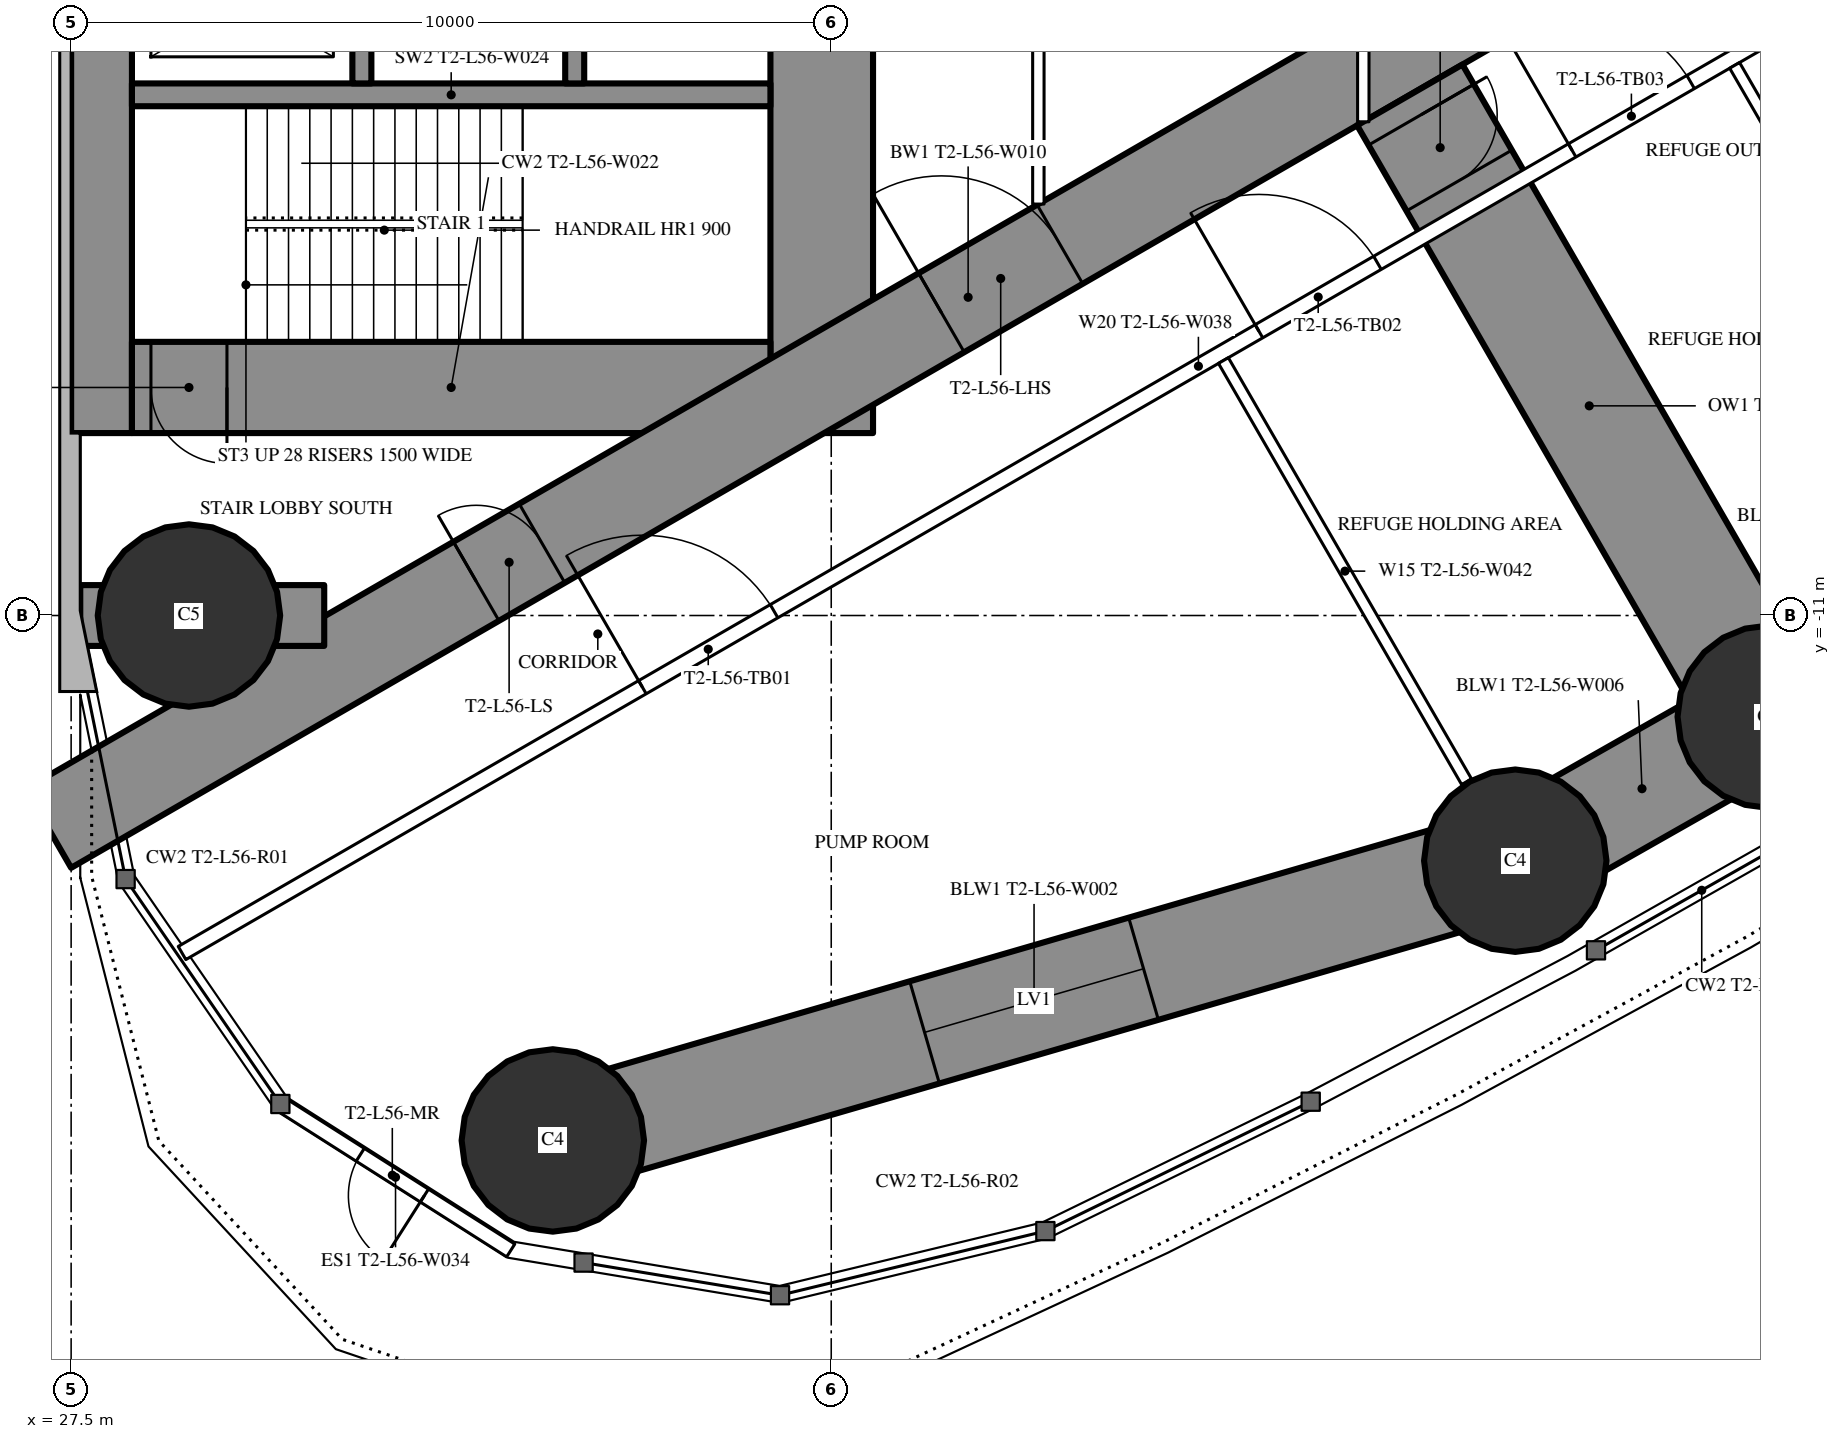
"""IFC4 building model, lengths in metres.
Left out: names, types, materials, properties, quantities, classifications, styles, units other than length and angle.
Written with IfcOpenShell. Run it as: python <this file> out.ifc"""

import sys

from ifc_helpers import new_model, si_unit, direction, frame, frame_2d, origin, origin_2d, place, context, subcontext, project, spatial, rectangle, circle, hollow_circle, extrude, element, fill, save


model = new_model("IFC4")
c1 = context("Model", 3, precision=1e-05, world=origin(), true_north=direction((0.0, 1.0)))
c2 = subcontext(c1, "Body", "Model", "MODEL_VIEW")
j1 = project(units=[si_unit("LENGTHUNIT", "METRE"), si_unit("PLANEANGLEUNIT", "RADIAN")], contexts=[c1])
p1 = place(None, origin())
s1 = spatial("IfcSite", under=j1, at=p1, CompositionType="ELEMENT")
p2 = place(p1, origin())
s2 = spatial("IfcBuilding", under=s1, at=p2, CompositionType="ELEMENT")
p3 = place(p2, frame((0.0, 0.0, 210.3)))
s3 = spatial("IfcBuildingStorey", under=s2, at=p3, CompositionType="ELEMENT", Elevation=210.3)
p4 = place(p3, frame((33.837, -17.906, 0.0), z_axis=(0.0, 0.0, 1.0), x_axis=(1.0, 0.0, 0.0)))
e1 = element("IfcColumn", 1, at=p4, inside=s3, PredefinedType="COLUMN", context=c2, shape_type="SweptSolid", body=[
    extrude(circle(Radius=1.2, at=origin_2d()), origin(), (0.0, 0.0, 1.0), 5.0),
])
p5 = place(p3, frame((29.05, -11.0, 0.0), z_axis=(0.0, 0.0, 1.0), x_axis=(1.0, 0.0, 0.0)))
e2 = element("IfcColumn", 2, at=p5, inside=s3, PredefinedType="COLUMN", context=c2, shape_type="SweptSolid", body=[
    extrude(hollow_circle(Radius=1.2, WallThickness=0.09, at=origin_2d()), origin(), (0.0, 0.0, 1.0), 5.0),
])
for number, where, z_axis, x_axis in (
    (3, (46.499, -14.226, 0.0), (0.0, 0.0, 1.0), (1.0, 0.0, 0.0)),
    (4, (49.834, -12.332, 0.0), (0.0, 0.0, 1.0), (1.0, 0.0, 0.0)),
):
    element("IfcColumn", number, at=place(p3, frame(where, z_axis=z_axis, x_axis=x_axis)), inside=s3, PredefinedType="COLUMN", context=c2, shape_type="SweptSolid", body=[
        extrude(circle(Radius=1.2, at=origin_2d()), origin(), (0.0, 0.0, 1.0), 5.0),
    ])
p6 = place(p3, frame((27.9, -8.6, 0.0), z_axis=(0.0, 0.0, 1.0), x_axis=(0.0, 1.0, 0.0)))
e5 = element("IfcWall", 5, at=p6, inside=s3, PredefinedType="SHEAR", context=c2, shape_type="SweptSolid", body=[
    extrude(rectangle(XDim=17.2, YDim=0.8, at=frame_2d((8.6, 0.0))), origin(), (0.0, 0.0, 1.0), 5.0),
])
p7 = place(p6, frame((9.35, 0.0, 0.0)))
e6 = element("IfcOpeningElement", 6, at=p7, cuts=e5, PredefinedType="OPENING", context=c2, shape_type="SweptSolid", body=[
    extrude(rectangle(XDim=0.9, YDim=2.2, at=frame_2d((0.45, 1.1))), frame((0.0, 0.41, 0.0), z_axis=(0.0, -1.0, 0.0), x_axis=(1.0, 0.0, 0.0)), (0.0, 0.0, 1.0), 0.82),
])
p8 = place(p3, frame((37.375, -8.6, 0.0), z_axis=(0.0, 0.0, 1.0), x_axis=(0.0, 1.0, 0.0)))
e7 = element("IfcWall", 7, at=p8, inside=s3, PredefinedType="SHEAR", context=c2, shape_type="SweptSolid", body=[
    extrude(rectangle(XDim=17.2, YDim=1.35, at=frame_2d((8.6, 0.0))), origin(), (0.0, 0.0, 1.0), 5.0),
])
p9 = place(p8, frame((7.7, 0.0, 0.0)))
e8 = element("IfcOpeningElement", 8, at=p9, cuts=e7, PredefinedType="OPENING", context=c2, shape_type="SweptSolid", body=[
    extrude(rectangle(XDim=1.8, YDim=2.2, at=frame_2d((0.9, 1.1))), frame((0.0, 0.685, 0.0), z_axis=(0.0, -1.0, 0.0), x_axis=(1.0, 0.0, 0.0)), (0.0, 0.0, 1.0), 1.37),
])
p10 = place(p3, frame((28.3, -8.0, 0.0), z_axis=(0.0, 0.0, 1.0), x_axis=(1.0, 0.0, 0.0)))
e9 = element("IfcWall", 9, at=p10, inside=s3, PredefinedType="SHEAR", context=c2, shape_type="SweptSolid", body=[
    extrude(rectangle(XDim=8.4, YDim=1.2, at=frame_2d((4.2, 0.0))), origin(), (0.0, 0.0, 1.0), 5.0),
])
p11 = place(p10, frame((0.25, 0.0, 0.0)))
e10 = element("IfcOpeningElement", 10, at=p11, cuts=e9, PredefinedType="OPENING", context=c2, shape_type="SweptSolid", body=[
    extrude(rectangle(XDim=1.0, YDim=2.2, at=frame_2d((0.5, 1.1))), frame((0.0, 0.61, 0.0), z_axis=(0.0, -1.0, 0.0), x_axis=(1.0, 0.0, 0.0)), (0.0, 0.0, 1.0), 1.22),
])
p12 = place(p3, frame((28.3, -4.15, 0.0), z_axis=(0.0, 0.0, 1.0), x_axis=(1.0, 0.0, 0.0)))
e11 = element("IfcWall", 11, at=p12, inside=s3, PredefinedType="SHEAR", context=c2, shape_type="SweptSolid", body=[
    extrude(rectangle(XDim=8.4, YDim=0.3, at=frame_2d((4.2, 0.0))), origin(), (0.0, 0.0, 1.0), 5.0),
])
p13 = place(p3, frame((31.325, -4.0, 0.0), z_axis=(0.0, 0.0, 1.0), x_axis=(0.0, 1.0, 0.0)))
e12 = element("IfcWall", 12, at=p13, inside=s3, PredefinedType="SHEAR", context=c2, shape_type="SweptSolid", body=[
    extrude(rectangle(XDim=2.1, YDim=0.25, at=frame_2d((1.05, 0.0))), origin(), (0.0, 0.0, 1.0), 5.0),
])
p14 = place(p13, frame((0.5, 0.0, 0.0)))
e13 = element("IfcOpeningElement", 13, at=p14, cuts=e12, PredefinedType="OPENING", context=c2, shape_type="SweptSolid", body=[
    extrude(rectangle(XDim=1.1, YDim=2.2, at=frame_2d((0.55, 1.1))), frame((0.0, 0.135, 0.0), z_axis=(0.0, -1.0, 0.0), x_axis=(1.0, 0.0, 0.0)), (0.0, 0.0, 1.0), 0.27),
])
p15 = place(p3, frame((34.125, -4.0, 0.0), z_axis=(0.0, 0.0, 1.0), x_axis=(0.0, 1.0, 0.0)))
e14 = element("IfcWall", 14, at=p15, inside=s3, PredefinedType="SHEAR", context=c2, shape_type="SweptSolid", body=[
    extrude(rectangle(XDim=2.35, YDim=0.25, at=frame_2d((1.175, 0.0))), origin(), (0.0, 0.0, 1.0), 5.0),
])
p16 = place(p3, frame((27.2, -13.8, 0.0), z_axis=(0.0, 0.0, 1.0), x_axis=(0.866027159892, 0.499996958321, 0.0)))
e15 = element("IfcWall", 15, at=p16, inside=s3, PredefinedType="SHEAR", context=c2, shape_type="SweptSolid", body=[
    extrude(rectangle(XDim=27.947, YDim=1.2, at=frame_2d((13.973, 0.0))), origin(), (0.0, 0.0, 1.0), 5.0),
])
p17 = place(p16, frame((6.5, 0.0, 0.0)))
e16 = element("IfcOpeningElement", 16, at=p17, cuts=e15, PredefinedType="OPENING", context=c2, shape_type="SweptSolid", body=[
    extrude(rectangle(XDim=1.0, YDim=2.2, at=frame_2d((0.5, 1.1))), frame((0.0, 0.61, 0.0), z_axis=(0.0, -1.0, 0.0), x_axis=(1.0, 0.0, 0.0)), (0.0, 0.0, 1.0), 1.22),
])
p18 = place(p16, frame((13.568, 0.0, 0.0)))
e17 = element("IfcOpeningElement", 17, at=p18, cuts=e15, PredefinedType="OPENING", context=c2, shape_type="SweptSolid", body=[
    extrude(rectangle(XDim=1.8, YDim=2.2, at=frame_2d((0.9, 1.1))), frame((0.0, 0.61, 0.0), z_axis=(0.0, -1.0, 0.0), x_axis=(1.0, 0.0, 0.0)), (0.0, 0.0, 1.0), 1.22),
])
p19 = place(p3, frame((27.62, -11.0, 0.0), z_axis=(0.0, 0.0, 1.0), x_axis=(1.0, 0.0, 0.0)))
e18 = element("IfcWall", 18, at=p19, inside=s3, PredefinedType="SHEAR", context=c2, shape_type="SweptSolid", body=[
    extrude(rectangle(XDim=3.209, YDim=0.8, at=frame_2d((1.605, 0.0))), origin(), (0.0, 0.0, 1.0), 5.0),
])
p20 = place(p3, frame((45.111, -4.152, 0.0), z_axis=(0.0, 0.0, 1.0), x_axis=(0.499986466662, -0.86603321712, 0.0)))
e19 = element("IfcWall", 19, at=p20, inside=s3, PredefinedType="SHEAR", context=c2, shape_type="SweptSolid", body=[
    extrude(rectangle(XDim=9.446, YDim=1.6, at=frame_2d((4.723, 0.0))), origin(), (0.0, 0.0, 1.0), 5.0),
])
p21 = place(p20, frame((0.3, 0.0, 0.0)))
e20 = element("IfcOpeningElement", 20, at=p21, cuts=e19, PredefinedType="OPENING", context=c2, shape_type="SweptSolid", body=[
    extrude(rectangle(XDim=1.0, YDim=2.2, at=frame_2d((0.5, 1.1))), frame((0.0, 0.81, 0.0), z_axis=(0.0, -1.0, 0.0), x_axis=(1.0, 0.0, 0.0)), (0.0, 0.0, 1.0), 1.62),
])
p22 = place(p3, frame((33.837, -17.906, 0.0), z_axis=(0.0, 0.0, 1.0), x_axis=(0.960258384252, 0.279112585659, 0.0)))
e21 = element("IfcWall", 21, at=p22, inside=s3, PredefinedType="SHEAR", context=c2, shape_type="SweptSolid", body=[
    extrude(rectangle(XDim=13.186, YDim=1.4, at=frame_2d((6.593, 0.0))), origin(), (0.0, 0.0, 1.0), 5.0),
])
p23 = place(p22, frame((5.093, 0.0, 0.6)))
e22 = element("IfcOpeningElement", 22, at=p23, cuts=e21, PredefinedType="OPENING", context=c2, shape_type="SweptSolid", body=[
    extrude(rectangle(XDim=3.0, YDim=1.2, at=frame_2d((1.5, 0.6))), frame((0.0, 0.71, 0.0), z_axis=(0.0, -1.0, 0.0), x_axis=(1.0, 0.0, 0.0)), (0.0, 0.0, 1.0), 1.42),
])
p24 = place(p3, frame((46.499, -14.226, 0.0), z_axis=(0.0, 0.0, 1.0), x_axis=(0.869560321562, 0.493826738001, 0.0)))
e23 = element("IfcWall", 23, at=p24, inside=s3, PredefinedType="SHEAR", context=c2, shape_type="SweptSolid", body=[
    extrude(rectangle(XDim=3.835, YDim=1.4, at=frame_2d((1.917, 0.0))), origin(), (0.0, 0.0, 1.0), 5.0),
])
p25 = place(p3, frame((49.834, -12.332, 0.0), z_axis=(0.0, 0.0, 1.0), x_axis=(0.853604257265, 0.520922040212, 0.0)))
e24 = element("IfcWall", 24, at=p25, inside=s3, PredefinedType="SHEAR", context=c2, shape_type="SweptSolid", body=[
    extrude(rectangle(XDim=3.835, YDim=1.4, at=frame_2d((1.917, 0.0))), origin(), (0.0, 0.0, 1.0), 5.0),
])
p26 = place(p3, frame((33.283, -19.354, 0.0), z_axis=(0.0, 0.0, 1.0), x_axis=(-0.843840574659, 0.536593966196, 0.0)))
e25 = element("IfcWall", 25, at=p26, inside=s3, PredefinedType="STANDARD", context=c2, shape_type="SweptSolid", body=[
    extrude(rectangle(XDim=3.592, YDim=0.2, at=frame_2d((1.796, 0.0))), origin(), (0.0, 0.0, 1.0), 4.75),
])
p27 = place(p26, frame((1.346, 0.0, 0.0)))
e26 = element("IfcOpeningElement", 26, at=p27, cuts=e25, PredefinedType="OPENING", context=c2, shape_type="SweptSolid", body=[
    extrude(rectangle(XDim=1.0, YDim=2.2, at=frame_2d((0.5, 1.1))), frame((0.0, 0.11, 0.0), z_axis=(0.0, -1.0, 0.0), x_axis=(1.0, 0.0, 0.0)), (0.0, 0.0, 1.0), 0.22),
])
p28 = place(p3, frame((28.959, -15.44, 0.0), z_axis=(0.0, 0.0, 1.0), x_axis=(0.866025227435, 0.500000305447, 0.0)))
e27 = element("IfcWall", 27, at=p28, inside=s3, PredefinedType="PARTITIONING", context=c2, shape_type="SweptSolid", body=[
    extrude(rectangle(XDim=30.88, YDim=0.2, at=frame_2d((15.44, 0.0))), origin(), (0.0, 0.0, 1.0), 4.75),
])
p29 = place(p28, frame((6.994, 0.0, 0.0)))
e28 = element("IfcOpeningElement", 28, at=p29, cuts=e27, PredefinedType="OPENING", context=c2, shape_type="SweptSolid", body=[
    extrude(rectangle(XDim=2.0, YDim=2.4, at=frame_2d((1.0, 1.2))), frame((0.0, 0.11, 0.0), z_axis=(0.0, -1.0, 0.0), x_axis=(1.0, 0.0, 0.0)), (0.0, 0.0, 1.0), 0.22),
])
p30 = place(p28, frame((16.36, 0.0, 0.0)))
e29 = element("IfcOpeningElement", 29, at=p30, cuts=e27, PredefinedType="OPENING", context=c2, shape_type="SweptSolid", body=[
    extrude(rectangle(XDim=1.8, YDim=2.2, at=frame_2d((0.9, 1.1))), frame((0.0, 0.11, 0.0), z_axis=(0.0, -1.0, 0.0), x_axis=(1.0, 0.0, 0.0)), (0.0, 0.0, 1.0), 0.22),
])
p31 = place(p28, frame((21.118, 0.0, 0.0)))
e30 = element("IfcOpeningElement", 30, at=p31, cuts=e27, PredefinedType="OPENING", context=c2, shape_type="SweptSolid", body=[
    extrude(rectangle(XDim=1.8, YDim=2.2, at=frame_2d((0.9, 1.1))), frame((0.0, 0.11, 0.0), z_axis=(0.0, -1.0, 0.0), x_axis=(1.0, 0.0, 0.0)), (0.0, 0.0, 1.0), 0.22),
])
p32 = place(p28, frame((25.341, 0.0, 0.0)))
e31 = element("IfcOpeningElement", 31, at=p32, cuts=e27, PredefinedType="OPENING", context=c2, shape_type="SweptSolid", body=[
    extrude(rectangle(XDim=1.8, YDim=2.2, at=frame_2d((0.9, 1.1))), frame((0.0, 0.11, 0.0), z_axis=(0.0, -1.0, 0.0), x_axis=(1.0, 0.0, 0.0)), (0.0, 0.0, 1.0), 0.22),
])
p33 = place(p3, frame((42.66, -7.646, 0.0), z_axis=(0.0, 0.0, 1.0), x_axis=(0.499996592859, -0.866027370889, 0.0)))
e32 = element("IfcWall", 32, at=p33, inside=s3, PredefinedType="PARTITIONING", context=c2, shape_type="SweptSolid", body=[
    extrude(rectangle(XDim=6.398, YDim=0.15, at=frame_2d((3.199, 0.0))), origin(), (0.0, 0.0, 1.0), 3.85),
])
p34 = place(p3, frame((49.385, -3.763, 0.0), z_axis=(0.0, 0.0, 1.0), x_axis=(0.499999447814, -0.866025722589, 0.0)))
e33 = element("IfcWall", 33, at=p34, inside=s3, PredefinedType="PARTITIONING", context=c2, shape_type="SweptSolid", body=[
    extrude(rectangle(XDim=6.333, YDim=0.15, at=frame_2d((3.166, 0.0))), origin(), (0.0, 0.0, 1.0), 3.85),
])
p35 = place(p3, frame((40.225, -5.587, 0.0), z_axis=(0.0, 0.0, 1.0), x_axis=(0.0, 1.0, 0.0)))
e34 = element("IfcWall", 34, at=p35, inside=s3, PredefinedType="PARTITIONING", context=c2, shape_type="SweptSolid", body=[
    extrude(rectangle(XDim=11.174, YDim=0.15, at=frame_2d((5.587, 0.0))), origin(), (0.0, 0.0, 1.0), 4.75),
])
p36 = place(p35, frame((4.687, 0.0, 0.0)))
e35 = element("IfcOpeningElement", 35, at=p36, cuts=e34, PredefinedType="OPENING", context=c2, shape_type="SweptSolid", body=[
    extrude(rectangle(XDim=1.8, YDim=2.2, at=frame_2d((0.9, 1.1))), frame((0.0, 0.085, 0.0), z_axis=(0.0, -1.0, 0.0), x_axis=(1.0, 0.0, 0.0)), (0.0, 0.0, 1.0), 0.17),
])
p37 = place(p3, frame((44.5, -4.505, 0.0), z_axis=(0.0, 0.0, 1.0), x_axis=(0.0, 1.0, 0.0)))
e36 = element("IfcWall", 36, at=p37, inside=s3, PredefinedType="PARTITIONING", context=c2, shape_type="SweptSolid", body=[
    extrude(rectangle(XDim=9.009, YDim=0.15, at=frame_2d((4.505, 0.0))), origin(), (0.0, 0.0, 1.0), 4.75),
])
p38 = place(p37, frame((4.005, 0.0, 0.0)))
e37 = element("IfcOpeningElement", 37, at=p38, cuts=e36, PredefinedType="OPENING", context=c2, shape_type="SweptSolid", body=[
    extrude(rectangle(XDim=1.0, YDim=2.2, at=frame_2d((0.5, 1.1))), frame((0.0, 0.085, 0.0), z_axis=(0.0, -1.0, 0.0), x_axis=(1.0, 0.0, 0.0)), (0.0, 0.0, 1.0), 0.17),
])
p39 = place(p23, origin())
e38 = element("IfcWindow", 38, at=p39, inside=s3, PartitioningType="SINGLE_PANEL", PredefinedType="WINDOW", context=c2, shape_type="SweptSolid", body=[
    extrude(rectangle(XDim=3.0, YDim=1.2, at=frame_2d((1.5, 0.6))), frame((0.0, 0.03, 0.0), z_axis=(0.0, -1.0, 0.0), x_axis=(1.0, 0.0, 0.0)), (0.0, 0.0, 1.0), 0.06),
])
fill(e22, e38)
p40 = place(p27, origin())
e39 = element("IfcDoor", 39, at=p40, inside=s3, OperationType="SINGLE_SWING_LEFT", PredefinedType="DOOR", context=c2, shape_type="SweptSolid", body=[
    extrude(rectangle(XDim=1.0, YDim=2.2, at=frame_2d((0.5, 1.1))), frame((0.0, 0.025, 0.0), z_axis=(0.0, -1.0, 0.0), x_axis=(1.0, 0.0, 0.0)), (0.0, 0.0, 1.0), 0.05),
])
fill(e26, e39)
p41 = place(p21, origin())
e40 = element("IfcDoor", 40, at=p41, inside=s3, OperationType="SINGLE_SWING_LEFT", PredefinedType="DOOR", context=c2, shape_type="SweptSolid", body=[
    extrude(rectangle(XDim=1.0, YDim=2.2, at=frame_2d((0.5, 1.1))), frame((0.0, 0.025, 0.0), z_axis=(0.0, -1.0, 0.0), x_axis=(1.0, 0.0, 0.0)), (0.0, 0.0, 1.0), 0.05),
])
fill(e20, e40)
p42 = place(p29, origin())
e41 = element("IfcDoor", 41, at=p42, inside=s3, OperationType="DOUBLE_DOOR_SINGLE_SWING", PredefinedType="DOOR", context=c2, shape_type="SweptSolid", body=[
    extrude(rectangle(XDim=2.0, YDim=2.4, at=frame_2d((1.0, 1.2))), frame((0.0, 0.025, 0.0), z_axis=(0.0, -1.0, 0.0), x_axis=(1.0, 0.0, 0.0)), (0.0, 0.0, 1.0), 0.05),
])
fill(e28, e41)
p43 = place(p30, origin())
e42 = element("IfcDoor", 42, at=p43, inside=s3, OperationType="DOUBLE_DOOR_SINGLE_SWING", PredefinedType="DOOR", context=c2, shape_type="SweptSolid", body=[
    extrude(rectangle(XDim=1.8, YDim=2.2, at=frame_2d((0.9, 1.1))), frame((0.0, 0.025, 0.0), z_axis=(0.0, -1.0, 0.0), x_axis=(1.0, 0.0, 0.0)), (0.0, 0.0, 1.0), 0.05),
])
fill(e29, e42)
p44 = place(p31, origin())
e43 = element("IfcDoor", 43, at=p44, inside=s3, OperationType="DOUBLE_DOOR_SINGLE_SWING", PredefinedType="DOOR", context=c2, shape_type="SweptSolid", body=[
    extrude(rectangle(XDim=1.8, YDim=2.2, at=frame_2d((0.9, 1.1))), frame((0.0, 0.025, 0.0), z_axis=(0.0, -1.0, 0.0), x_axis=(1.0, 0.0, 0.0)), (0.0, 0.0, 1.0), 0.05),
])
fill(e30, e43)
p45 = place(p17, origin())
e44 = element("IfcDoor", 44, at=p45, inside=s3, OperationType="SINGLE_SWING_LEFT", PredefinedType="DOOR", context=c2, shape_type="SweptSolid", body=[
    extrude(rectangle(XDim=1.0, YDim=2.2, at=frame_2d((0.5, 1.1))), frame((0.0, 0.025, 0.0), z_axis=(0.0, -1.0, 0.0), x_axis=(1.0, 0.0, 0.0)), (0.0, 0.0, 1.0), 0.05),
])
fill(e16, e44)
p46 = place(p18, origin())
e45 = element("IfcDoor", 45, at=p46, inside=s3, OperationType="DOUBLE_DOOR_SINGLE_SWING", PredefinedType="DOOR", context=c2, shape_type="SweptSolid", body=[
    extrude(rectangle(XDim=1.8, YDim=2.2, at=frame_2d((0.9, 1.1))), frame((0.0, 0.025, 0.0), z_axis=(0.0, -1.0, 0.0), x_axis=(1.0, 0.0, 0.0)), (0.0, 0.0, 1.0), 0.05),
])
fill(e17, e45)
p47 = place(p11, origin())
e46 = element("IfcDoor", 46, at=p47, inside=s3, OperationType="SINGLE_SWING_RIGHT", PredefinedType="DOOR", context=c2, shape_type="SweptSolid", body=[
    extrude(rectangle(XDim=1.0, YDim=2.2, at=frame_2d((0.5, 1.1))), frame((0.0, 0.025, 0.0), z_axis=(0.0, -1.0, 0.0), x_axis=(1.0, 0.0, 0.0)), (0.0, 0.0, 1.0), 0.05),
])
fill(e10, e46)
save(model, sys.argv[1])
